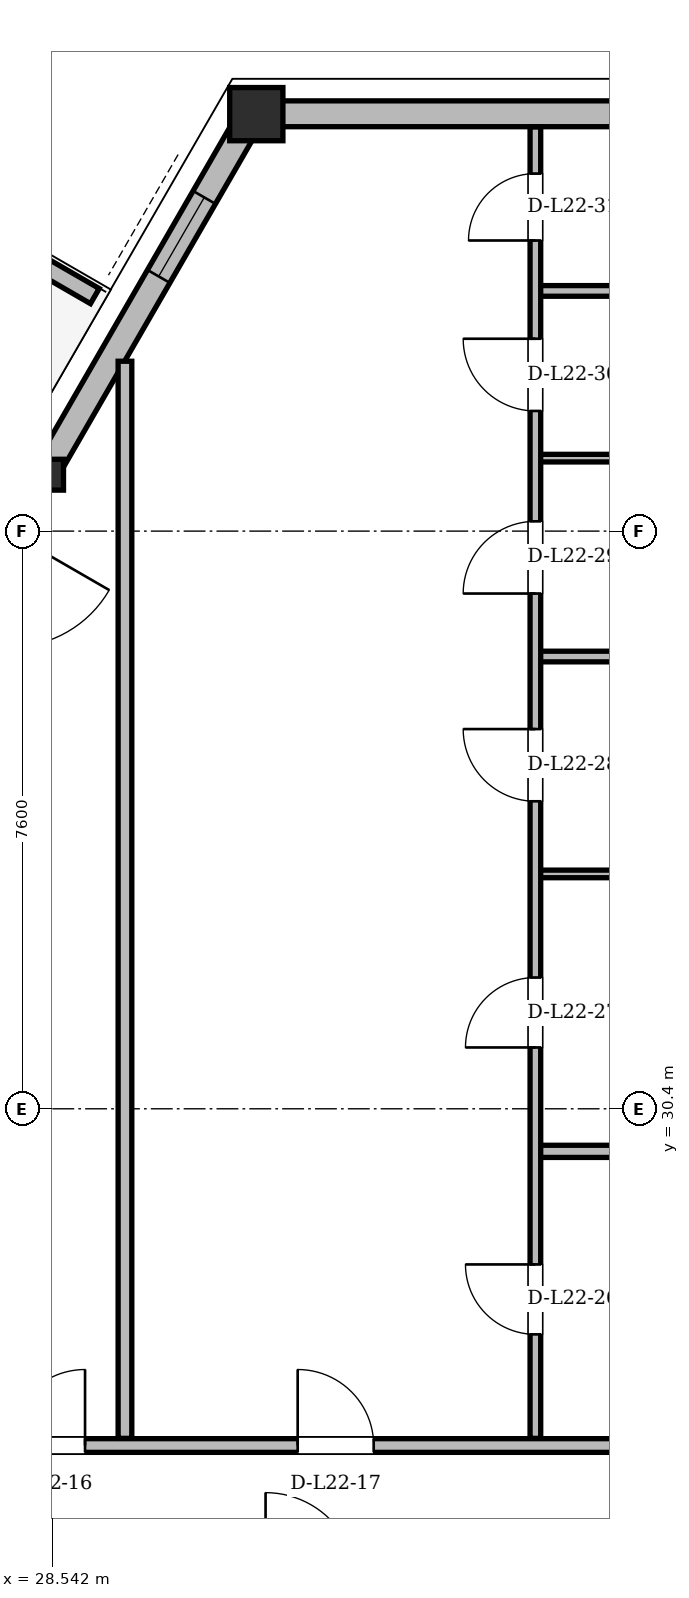
"""IFC4 building model, lengths in metres.
Left out: names, types, materials, properties, quantities, classifications, styles, units other than length and angle.
Written with IfcOpenShell. Run it as: python <this file> out.ifc"""

import sys

from ifc_helpers import new_model, si_unit, direction, frame, frame_2d, origin, origin_2d, place, context, subcontext, project, spatial, polyline, rectangle, hollow_rectangle, i_section, outline, extrude, element, fill, save


model = new_model("IFC4")
c1 = context("Model", 3, precision=1e-05, world=origin(), true_north=direction((0.0, 1.0)))
c2 = subcontext(c1, "Body", "Model", "MODEL_VIEW")
j1 = project(units=[si_unit("LENGTHUNIT", "METRE"), si_unit("PLANEANGLEUNIT", "RADIAN")], contexts=[c1])
p1 = place(None, origin())
s1 = spatial("IfcSite", under=j1, at=p1, CompositionType="ELEMENT")
p2 = place(p1, origin())
s2 = spatial("IfcBuilding", under=s1, at=p2, CompositionType="ELEMENT")
p3 = place(p2, frame((0.0, 0.0, 86.1)))
s3 = spatial("IfcBuildingStorey", under=s2, at=p3, CompositionType="ELEMENT", Elevation=86.1)
p4 = place(p3, frame((31.179, 43.49, 0.004), z_axis=(0.027523634775, -0.002650424089, 0.999617639291), x_axis=(0.095852900965, 0.995395510024, 0.0)))
e1 = element("IfcColumn", 1, at=p4, inside=s3, PredefinedType="COLUMN", context=c2, shape_type="SweptSolid", body=[
    extrude(hollow_rectangle(XDim=0.7, YDim=0.7, WallThickness=0.055, at=origin_2d()), origin(), (0.0, 0.0, 1.0), 3.593),
])
p5 = place(p3, frame((28.443, 38.753, 0.004), z_axis=(0.025621714131, -0.005844741155, 0.999654623741), x_axis=(0.222403463218, 0.974954716666, 0.0)))
e2 = element("IfcColumn", 2, at=p5, inside=s3, PredefinedType="COLUMN", context=c2, shape_type="SweptSolid", body=[
    extrude(i_section(OverallWidth=0.404, OverallDepth=0.406, WebThickness=0.027, FlangeThickness=0.044, at=origin_2d()), origin(), (0.0, 0.0, 1.0), 3.592),
])
p6 = place(p3, frame((43.821, 43.49, 0.0), z_axis=(0.0, 0.0, 1.0), x_axis=(-1.0, 0.0, 0.0)))
e3 = element("IfcWall", 3, at=p6, inside=s3, PredefinedType="SOLIDWALL", context=c2, shape_type="SweptSolid", body=[
    extrude(rectangle(XDim=12.643, YDim=0.34, at=frame_2d((6.321, 0.0))), origin(), (0.0, 0.0, 1.0), 2.578),
])
p7 = place(p6, frame((4.799, 0.0, 0.85)))
e4 = element("IfcOpeningElement", 4, at=p7, cuts=e3, PredefinedType="OPENING", context=c2, shape_type="SweptSolid", body=[
    extrude(rectangle(XDim=0.9, YDim=1.15, at=frame_2d((0.45, 0.575))), frame((0.0, 0.17, 0.0), z_axis=(0.0, -1.0, 0.0), x_axis=(1.0, 0.0, 0.0)), (0.0, 0.0, 1.0), 0.34),
])
p8 = place(p3, frame((31.179, 43.49, 0.0), z_axis=(0.0, 0.0, 1.0), x_axis=(-0.49999956034, -0.866025657622, 0.0)))
e5 = element("IfcWall", 5, at=p8, inside=s3, PredefinedType="SOLIDWALL", context=c2, shape_type="SweptSolid", body=[
    extrude(rectangle(XDim=34.192, YDim=0.34, at=frame_2d((17.096, 0.0))), origin(), (0.0, 0.0, 1.0), 2.578),
])
p9 = place(p8, frame((6.369, 0.0, 0.0)))
e6 = element("IfcOpeningElement", 6, at=p9, cuts=e5, PredefinedType="OPENING", context=c2, shape_type="SweptSolid", body=[
    extrude(rectangle(XDim=1.5, YDim=2.2, at=frame_2d((0.75, 1.1))), frame((0.0, 0.17, 0.0), z_axis=(0.0, -1.0, 0.0), x_axis=(1.0, 0.0, 0.0)), (0.0, 0.0, 1.0), 0.34),
])
p10 = place(p8, frame((26.128, 0.0, 0.0)))
e7 = element("IfcOpeningElement", 7, at=p10, cuts=e5, PredefinedType="OPENING", context=c2, shape_type="SweptSolid", body=[
    extrude(rectangle(XDim=1.5, YDim=2.2, at=frame_2d((0.75, 1.1))), frame((0.0, 0.17, 0.0), z_axis=(0.0, -1.0, 0.0), x_axis=(1.0, 0.0, 0.0)), (0.0, 0.0, 1.0), 0.34),
])
p11 = place(p8, frame((32.054, 0.0, 0.85)))
e8 = element("IfcOpeningElement", 8, at=p11, cuts=e5, PredefinedType="OPENING", context=c2, shape_type="SweptSolid", body=[
    extrude(rectangle(XDim=1.2, YDim=1.48, at=frame_2d((0.6, 0.74))), frame((0.0, 0.17, 0.0), z_axis=(0.0, -1.0, 0.0), x_axis=(1.0, 0.0, 0.0)), (0.0, 0.0, 1.0), 0.34),
])
p12 = place(p8, frame((29.596, 0.0, 0.85)))
e9 = element("IfcOpeningElement", 9, at=p12, cuts=e5, PredefinedType="OPENING", context=c2, shape_type="SweptSolid", body=[
    extrude(rectangle(XDim=1.2, YDim=1.48, at=frame_2d((0.6, 0.74))), frame((0.0, 0.17, 0.0), z_axis=(0.0, -1.0, 0.0), x_axis=(1.0, 0.0, 0.0)), (0.0, 0.0, 1.0), 0.34),
])
p13 = place(p8, frame((10.98, 0.0, 0.85)))
e10 = element("IfcOpeningElement", 10, at=p13, cuts=e5, PredefinedType="OPENING", context=c2, shape_type="SweptSolid", body=[
    extrude(rectangle(XDim=1.2, YDim=1.48, at=frame_2d((0.6, 0.74))), frame((0.0, 0.17, 0.0), z_axis=(0.0, -1.0, 0.0), x_axis=(1.0, 0.0, 0.0)), (0.0, 0.0, 1.0), 0.34),
])
p14 = place(p8, frame((14.68, 0.0, 0.85)))
e11 = element("IfcOpeningElement", 11, at=p14, cuts=e5, PredefinedType="OPENING", context=c2, shape_type="SweptSolid", body=[
    extrude(rectangle(XDim=1.2, YDim=1.48, at=frame_2d((0.6, 0.74))), frame((0.0, 0.17, 0.0), z_axis=(0.0, -1.0, 0.0), x_axis=(1.0, 0.0, 0.0)), (0.0, 0.0, 1.0), 0.34),
])
p15 = place(p8, frame((17.274, 0.0, 0.85)))
e12 = element("IfcOpeningElement", 12, at=p15, cuts=e5, PredefinedType="OPENING", context=c2, shape_type="SweptSolid", body=[
    extrude(rectangle(XDim=1.2, YDim=1.48, at=frame_2d((0.6, 0.74))), frame((0.0, 0.17, 0.0), z_axis=(0.0, -1.0, 0.0), x_axis=(1.0, 0.0, 0.0)), (0.0, 0.0, 1.0), 0.34),
])
p16 = place(p8, frame((1.27, 0.0, 0.85)))
e13 = element("IfcOpeningElement", 13, at=p16, cuts=e5, PredefinedType="OPENING", context=c2, shape_type="SweptSolid", body=[
    extrude(rectangle(XDim=1.2, YDim=1.48, at=frame_2d((0.6, 0.74))), frame((0.0, 0.17, 0.0), z_axis=(0.0, -1.0, 0.0), x_axis=(1.0, 0.0, 0.0)), (0.0, 0.0, 1.0), 0.34),
])
p17 = place(p3, frame((29.104, 41.092, 0.0), z_axis=(0.0, 0.0, 1.0), x_axis=(-0.866012356593, 0.500022597718, 0.0)))
e14 = element("IfcWall", 14, at=p17, inside=s3, PredefinedType="PARAPET", context=c2, shape_type="SweptSolid", body=[
    extrude(outline(polyline([(0.0, 0.0), (2.042, 0.0), (2.042, 1.1), (0.0, 1.32), (0.0, 0.0)])), frame((0.0, 0.115, 0.0), z_axis=(0.0, -1.0, 0.0), x_axis=(1.0, 0.0, 0.0)), (0.0, 0.0, 1.0), 0.23),
])
p18 = place(p3, frame((27.55, 25.97, 0.0), z_axis=(0.0, 0.0, 1.0), x_axis=(1.0, 0.0, 0.0)))
e15 = element("IfcWall", 15, at=p18, inside=s3, PredefinedType="PARTITIONING", context=c2, shape_type="SweptSolid", body=[
    extrude(rectangle(XDim=19.9, YDim=0.18, at=frame_2d((9.95, 0.0))), origin(), (0.0, 0.0, 1.0), 2.814),
])
p19 = place(p18, frame((0.425, 0.0, 0.0)))
e16 = element("IfcOpeningElement", 16, at=p19, cuts=e15, PredefinedType="OPENING", context=c2, shape_type="SweptSolid", body=[
    extrude(rectangle(XDim=1.0, YDim=2.18, at=frame_2d((0.5, 1.09))), frame((0.0, 0.09, 0.0), z_axis=(0.0, -1.0, 0.0), x_axis=(1.0, 0.0, 0.0)), (0.0, 0.0, 1.0), 0.18),
])
p20 = place(p18, frame((4.222, 0.0, 0.0)))
e17 = element("IfcOpeningElement", 17, at=p20, cuts=e15, PredefinedType="OPENING", context=c2, shape_type="SweptSolid", body=[
    extrude(rectangle(XDim=1.0, YDim=2.18, at=frame_2d((0.5, 1.09))), frame((0.0, 0.09, 0.0), z_axis=(0.0, -1.0, 0.0), x_axis=(1.0, 0.0, 0.0)), (0.0, 0.0, 1.0), 0.18),
])
p21 = place(p18, frame((13.4, 0.0, 0.0)))
e18 = element("IfcOpeningElement", 18, at=p21, cuts=e15, PredefinedType="OPENING", context=c2, shape_type="SweptSolid", body=[
    extrude(rectangle(XDim=1.3, YDim=2.2, at=frame_2d((0.65, 1.1))), frame((0.0, 0.09, 0.0), z_axis=(0.0, -1.0, 0.0), x_axis=(1.0, 0.0, 0.0)), (0.0, 0.0, 1.0), 0.18),
])
p22 = place(p18, frame((16.95, 0.0, 0.0)))
e19 = element("IfcOpeningElement", 19, at=p22, cuts=e15, PredefinedType="OPENING", context=c2, shape_type="SweptSolid", body=[
    extrude(rectangle(XDim=1.0, YDim=2.18, at=frame_2d((0.5, 1.09))), frame((0.0, 0.09, 0.0), z_axis=(0.0, -1.0, 0.0), x_axis=(1.0, 0.0, 0.0)), (0.0, 0.0, 1.0), 0.18),
])
p23 = place(p3, frame((34.9, 29.84, 0.0), z_axis=(0.0, 0.0, 1.0), x_axis=(1.0, 0.0, 0.0)))
e20 = element("IfcWall", 20, at=p23, inside=s3, PredefinedType="PARTITIONING", context=c2, shape_type="SweptSolid", body=[
    extrude(rectangle(XDim=3.15, YDim=0.16, at=frame_2d((1.575, 0.0))), origin(), (0.0, 0.0, 1.0), 3.36),
])
p24 = place(p3, frame((34.9, 33.49, 0.0), z_axis=(0.0, 0.0, 1.0), x_axis=(1.0, 0.0, 0.0)))
e21 = element("IfcWall", 21, at=p24, inside=s3, PredefinedType="PARTITIONING", context=c2, shape_type="SweptSolid", body=[
    extrude(rectangle(XDim=3.15, YDim=0.1, at=frame_2d((1.575, 0.0))), origin(), (0.0, 0.0, 1.0), 3.36),
])
p25 = place(p3, frame((34.9, 36.35, 0.0), z_axis=(0.0, 0.0, 1.0), x_axis=(1.0, 0.0, 0.0)))
e22 = element("IfcWall", 22, at=p25, inside=s3, PredefinedType="PARTITIONING", context=c2, shape_type="SweptSolid", body=[
    extrude(rectangle(XDim=3.15, YDim=0.14, at=frame_2d((1.575, 0.0))), origin(), (0.0, 0.0, 1.0), 3.36),
])
p26 = place(p3, frame((34.9, 38.96, 0.0), z_axis=(0.0, 0.0, 1.0), x_axis=(1.0, 0.0, 0.0)))
e23 = element("IfcWall", 23, at=p26, inside=s3, PredefinedType="PARTITIONING", context=c2, shape_type="SweptSolid", body=[
    extrude(rectangle(XDim=3.15, YDim=0.1, at=frame_2d((1.575, 0.0))), origin(), (0.0, 0.0, 1.0), 3.36),
])
p27 = place(p3, frame((34.9, 41.16, 0.0), z_axis=(0.0, 0.0, 1.0), x_axis=(1.0, 0.0, 0.0)))
e24 = element("IfcWall", 24, at=p27, inside=s3, PredefinedType="PARTITIONING", context=c2, shape_type="SweptSolid", body=[
    extrude(rectangle(XDim=3.15, YDim=0.14, at=frame_2d((1.575, 0.0))), origin(), (0.0, 0.0, 1.0), 3.36),
])
p28 = place(p3, frame((29.5, 26.064, 0.0), z_axis=(0.0, 0.0, 1.0), x_axis=(0.0, 1.0, 0.0)))
e25 = element("IfcWall", 25, at=p28, inside=s3, PredefinedType="PARTITIONING", context=c2, shape_type="SweptSolid", body=[
    extrude(rectangle(XDim=14.171, YDim=0.18, at=frame_2d((7.085, 0.0))), origin(), (0.0, 0.0, 1.0), 2.578),
])
p29 = place(p3, frame((34.9, 26.064, 0.0), z_axis=(0.0, 0.0, 1.0), x_axis=(0.0, 1.0, 0.0)))
e26 = element("IfcWall", 26, at=p29, inside=s3, PredefinedType="PARTITIONING", context=c2, shape_type="SweptSolid", body=[
    extrude(rectangle(XDim=17.252, YDim=0.14, at=frame_2d((8.626, 0.0))), origin(), (0.0, 0.0, 1.0), 3.36),
])
p30 = place(p29, frame((1.368, 0.0, 0.0)))
e27 = element("IfcOpeningElement", 27, at=p30, cuts=e26, PredefinedType="OPENING", context=c2, shape_type="SweptSolid", body=[
    extrude(rectangle(XDim=0.92, YDim=2.12, at=frame_2d((0.46, 1.06))), frame((0.0, 0.07, 0.0), z_axis=(0.0, -1.0, 0.0), x_axis=(1.0, 0.0, 0.0)), (0.0, 0.0, 1.0), 0.14),
])
p31 = place(p29, frame((5.143, 0.0, 0.0)))
e28 = element("IfcOpeningElement", 28, at=p31, cuts=e26, PredefinedType="OPENING", context=c2, shape_type="SweptSolid", body=[
    extrude(rectangle(XDim=0.92, YDim=2.12, at=frame_2d((0.46, 1.06))), frame((0.0, 0.07, 0.0), z_axis=(0.0, -1.0, 0.0), x_axis=(1.0, 0.0, 0.0)), (0.0, 0.0, 1.0), 0.14),
])
p32 = place(p29, frame((8.382, 0.0, 0.0)))
e29 = element("IfcOpeningElement", 29, at=p32, cuts=e26, PredefinedType="OPENING", context=c2, shape_type="SweptSolid", body=[
    extrude(rectangle(XDim=0.95, YDim=2.1, at=frame_2d((0.475, 1.05))), frame((0.0, 0.07, 0.0), z_axis=(0.0, -1.0, 0.0), x_axis=(1.0, 0.0, 0.0)), (0.0, 0.0, 1.0), 0.14),
])
p33 = place(p29, frame((11.115, 0.0, 0.0)))
e30 = element("IfcOpeningElement", 30, at=p33, cuts=e26, PredefinedType="OPENING", context=c2, shape_type="SweptSolid", body=[
    extrude(rectangle(XDim=0.95, YDim=2.1, at=frame_2d((0.475, 1.05))), frame((0.0, 0.07, 0.0), z_axis=(0.0, -1.0, 0.0), x_axis=(1.0, 0.0, 0.0)), (0.0, 0.0, 1.0), 0.14),
])
p34 = place(p29, frame((13.517, 0.0, 0.0)))
e31 = element("IfcOpeningElement", 31, at=p34, cuts=e26, PredefinedType="OPENING", context=c2, shape_type="SweptSolid", body=[
    extrude(rectangle(XDim=0.95, YDim=2.1, at=frame_2d((0.475, 1.05))), frame((0.0, 0.07, 0.0), z_axis=(0.0, -1.0, 0.0), x_axis=(1.0, 0.0, 0.0)), (0.0, 0.0, 1.0), 0.14),
])
p35 = place(p29, frame((15.76, 0.0, 0.0)))
e32 = element("IfcOpeningElement", 32, at=p35, cuts=e26, PredefinedType="OPENING", context=c2, shape_type="SweptSolid", body=[
    extrude(rectangle(XDim=0.88, YDim=2.08, at=frame_2d((0.44, 1.04))), frame((0.0, 0.07, 0.0), z_axis=(0.0, -1.0, 0.0), x_axis=(1.0, 0.0, 0.0)), (0.0, 0.0, 1.0), 0.14),
])
p36 = place(p16, origin())
e33 = element("IfcWindow", 33, at=p36, inside=s3, PartitioningType="SINGLE_PANEL", PredefinedType="WINDOW", context=c2, shape_type="SweptSolid", body=[
    extrude(rectangle(XDim=1.2, YDim=1.48, at=frame_2d((0.6, 0.74))), frame((0.0, 0.03, 0.0), z_axis=(0.0, -1.0, 0.0), x_axis=(1.0, 0.0, 0.0)), (0.0, 0.0, 1.0), 0.06),
])
fill(e13, e33)
p37 = place(p19, origin())
e34 = element("IfcDoor", 34, at=p37, inside=s3, OperationType="SINGLE_SWING_RIGHT", PredefinedType="DOOR", context=c2, shape_type="SweptSolid", body=[
    extrude(rectangle(XDim=1.0, YDim=2.18, at=frame_2d((0.5, 1.09))), frame((0.0, 0.025, 0.0), z_axis=(0.0, -1.0, 0.0), x_axis=(1.0, 0.0, 0.0)), (0.0, 0.0, 1.0), 0.05),
])
fill(e16, e34)
p38 = place(p20, origin())
e35 = element("IfcDoor", 35, at=p38, inside=s3, OperationType="SINGLE_SWING_LEFT", PredefinedType="DOOR", context=c2, shape_type="SweptSolid", body=[
    extrude(rectangle(XDim=1.0, YDim=2.18, at=frame_2d((0.5, 1.09))), frame((0.0, 0.025, 0.0), z_axis=(0.0, -1.0, 0.0), x_axis=(1.0, 0.0, 0.0)), (0.0, 0.0, 1.0), 0.05),
])
fill(e17, e35)
p39 = place(p30, origin())
e36 = element("IfcDoor", 36, at=p39, inside=s3, OperationType="SINGLE_SWING_RIGHT", PredefinedType="DOOR", context=c2, shape_type="SweptSolid", body=[
    extrude(rectangle(XDim=0.92, YDim=2.12, at=frame_2d((0.46, 1.06))), frame((0.0, 0.025, 0.0), z_axis=(0.0, -1.0, 0.0), x_axis=(1.0, 0.0, 0.0)), (0.0, 0.0, 1.0), 0.05),
])
fill(e27, e36)
p40 = place(p31, origin())
e37 = element("IfcDoor", 37, at=p40, inside=s3, OperationType="SINGLE_SWING_LEFT", PredefinedType="DOOR", context=c2, shape_type="SweptSolid", body=[
    extrude(rectangle(XDim=0.92, YDim=2.12, at=frame_2d((0.46, 1.06))), frame((0.0, 0.025, 0.0), z_axis=(0.0, -1.0, 0.0), x_axis=(1.0, 0.0, 0.0)), (0.0, 0.0, 1.0), 0.05),
])
fill(e28, e37)
p41 = place(p32, origin())
e38 = element("IfcDoor", 38, at=p41, inside=s3, OperationType="SINGLE_SWING_RIGHT", PredefinedType="DOOR", context=c2, shape_type="SweptSolid", body=[
    extrude(rectangle(XDim=0.95, YDim=2.1, at=frame_2d((0.475, 1.05))), frame((0.0, 0.025, 0.0), z_axis=(0.0, -1.0, 0.0), x_axis=(1.0, 0.0, 0.0)), (0.0, 0.0, 1.0), 0.05),
])
fill(e29, e38)
p42 = place(p33, origin())
e39 = element("IfcDoor", 39, at=p42, inside=s3, OperationType="SINGLE_SWING_LEFT", PredefinedType="DOOR", context=c2, shape_type="SweptSolid", body=[
    extrude(rectangle(XDim=0.95, YDim=2.1, at=frame_2d((0.475, 1.05))), frame((0.0, 0.025, 0.0), z_axis=(0.0, -1.0, 0.0), x_axis=(1.0, 0.0, 0.0)), (0.0, 0.0, 1.0), 0.05),
])
fill(e30, e39)
p43 = place(p34, origin())
e40 = element("IfcDoor", 40, at=p43, inside=s3, OperationType="SINGLE_SWING_RIGHT", PredefinedType="DOOR", context=c2, shape_type="SweptSolid", body=[
    extrude(rectangle(XDim=0.95, YDim=2.1, at=frame_2d((0.475, 1.05))), frame((0.0, 0.025, 0.0), z_axis=(0.0, -1.0, 0.0), x_axis=(1.0, 0.0, 0.0)), (0.0, 0.0, 1.0), 0.05),
])
fill(e31, e40)
p44 = place(p35, origin())
e41 = element("IfcDoor", 41, at=p44, inside=s3, OperationType="SINGLE_SWING_LEFT", PredefinedType="DOOR", context=c2, shape_type="SweptSolid", body=[
    extrude(rectangle(XDim=0.88, YDim=2.08, at=frame_2d((0.44, 1.04))), frame((0.0, 0.025, 0.0), z_axis=(0.0, -1.0, 0.0), x_axis=(1.0, 0.0, 0.0)), (0.0, 0.0, 1.0), 0.05),
])
fill(e32, e41)
save(model, sys.argv[1])
